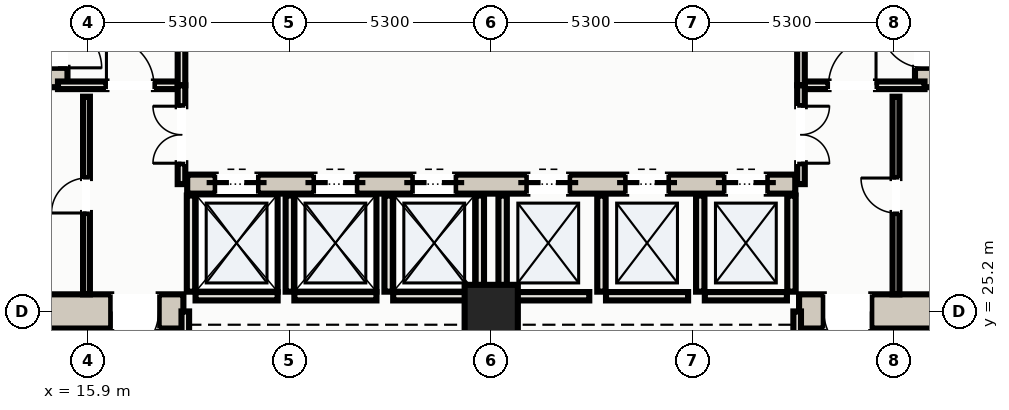
"""IFC4 building model, lengths in metres.
Left out: names, types, materials, properties, quantities, classifications, styles, units other than length and angle.
Written with IfcOpenShell. Run it as: python <this file> out.ifc"""

import sys

from ifc_helpers import new_model, si_unit, direction, frame, frame_2d, origin, origin_2d, place, context, subcontext, project, spatial, rectangle, hollow_rectangle, extrude, element, fill, save


model = new_model("IFC4")
c1 = context("Model", 3, precision=1e-05, world=origin(), true_north=direction((0.0, 1.0)))
c2 = subcontext(c1, "Body", "Model", "MODEL_VIEW")
j1 = project(units=[si_unit("LENGTHUNIT", "METRE"), si_unit("PLANEANGLEUNIT", "RADIAN")], contexts=[c1])
p1 = place(None, origin())
s1 = spatial("IfcSite", under=j1, at=p1, CompositionType="ELEMENT")
p2 = place(p1, origin())
s2 = spatial("IfcBuilding", under=s1, at=p2, CompositionType="ELEMENT")
p3 = place(p2, origin())
s3 = spatial("IfcBuildingStorey", under=s2, at=p3, CompositionType="ELEMENT", Elevation=0.0)
p4 = place(p3, frame((10.15, 25.2, 0.0), z_axis=(0.0, 0.0, 1.0), x_axis=(1.0, 0.0, 0.0)))
e1 = element("IfcWall", 1, at=p4, inside=s3, PredefinedType="SHEAR", context=c2, shape_type="SweptSolid", body=[
    extrude(rectangle(XDim=8.25, YDim=0.9, at=frame_2d((4.125, 0.0))), origin(), (0.0, 0.0, 1.0), 4.95),
])
p5 = place(p4, frame((6.35, 0.0, 0.0)))
e2 = element("IfcOpeningElement", 2, at=p5, cuts=e1, PredefinedType="OPENING", context=c2, shape_type="SweptSolid", body=[
    extrude(rectangle(XDim=1.25, YDim=2.2, at=frame_2d((0.625, 1.1))), frame((0.0, 0.46, 0.0), z_axis=(0.0, -1.0, 0.0), x_axis=(1.0, 0.0, 0.0)), (0.0, 0.0, 1.0), 0.92),
])
p6 = place(p3, frame((34.6, 25.2, 0.0), z_axis=(0.0, 0.0, 1.0), x_axis=(1.0, 0.0, 0.0)))
e3 = element("IfcWall", 3, at=p6, inside=s3, PredefinedType="SHEAR", context=c2, shape_type="SweptSolid", body=[
    extrude(rectangle(XDim=8.25, YDim=0.9, at=frame_2d((4.125, 0.0))), origin(), (0.0, 0.0, 1.0), 4.95),
])
p7 = place(p6, frame((0.65, 0.0, 0.0)))
e4 = element("IfcOpeningElement", 4, at=p7, cuts=e3, PredefinedType="OPENING", context=c2, shape_type="SweptSolid", body=[
    extrude(rectangle(XDim=1.25, YDim=2.2, at=frame_2d((0.625, 1.1))), frame((0.0, 0.46, 0.0), z_axis=(0.0, -1.0, 0.0), x_axis=(1.0, 0.0, 0.0)), (0.0, 0.0, 1.0), 0.92),
])
p8 = place(p3, frame((15.1, 31.1, 0.0), z_axis=(0.0, 0.0, 1.0), x_axis=(0.0, 1.0, 0.0)))
e5 = element("IfcWall", 5, at=p8, inside=s3, PredefinedType="SHEAR", context=c2, shape_type="SweptSolid", body=[
    extrude(rectangle(XDim=8.45, YDim=0.5, at=frame_2d((4.225, 0.0))), origin(), (0.0, 0.0, 1.0), 4.95),
])
p9 = place(p8, frame((0.51, 0.0, 0.0)))
e6 = element("IfcOpeningElement", 6, at=p9, cuts=e5, PredefinedType="OPENING", context=c2, shape_type="SweptSolid", body=[
    extrude(rectangle(XDim=1.15, YDim=2.2, at=frame_2d((0.575, 1.1))), frame((0.0, 0.26, 0.0), z_axis=(0.0, -1.0, 0.0), x_axis=(1.0, 0.0, 0.0)), (0.0, 0.0, 1.0), 0.52),
])
p10 = place(p3, frame((37.9, 31.1, 0.0), z_axis=(0.0, 0.0, 1.0), x_axis=(0.0, 1.0, 0.0)))
e7 = element("IfcWall", 7, at=p10, inside=s3, PredefinedType="SHEAR", context=c2, shape_type="SweptSolid", body=[
    extrude(rectangle(XDim=8.45, YDim=0.5, at=frame_2d((4.225, 0.0))), origin(), (0.0, 0.0, 1.0), 4.95),
])
p11 = place(p10, frame((0.51, 0.0, 0.0)))
e8 = element("IfcOpeningElement", 8, at=p11, cuts=e7, PredefinedType="OPENING", context=c2, shape_type="SweptSolid", body=[
    extrude(rectangle(XDim=1.15, YDim=2.2, at=frame_2d((0.575, 1.1))), frame((0.0, 0.26, 0.0), z_axis=(0.0, -1.0, 0.0), x_axis=(1.0, 0.0, 0.0)), (0.0, 0.0, 1.0), 0.52),
])
p12 = place(p3, frame((18.5, 28.55, 0.0), z_axis=(0.0, 0.0, 1.0), x_axis=(1.0, 0.0, 0.0)))
e9 = element("IfcWall", 9, at=p12, inside=s3, PredefinedType="SHEAR", context=c2, shape_type="SweptSolid", body=[
    extrude(rectangle(XDim=16.0, YDim=0.5, at=frame_2d((8.0, 0.0))), origin(), (0.0, 0.0, 1.0), 4.95),
])
p13 = place(p12, frame((0.75, 0.0, 0.0)))
e10 = element("IfcOpeningElement", 10, at=p13, cuts=e9, PredefinedType="OPENING", context=c2, shape_type="SweptSolid", body=[
    extrude(rectangle(XDim=1.1, YDim=2.15, at=frame_2d((0.55, 1.075))), frame((0.0, 0.26, 0.0), z_axis=(0.0, -1.0, 0.0), x_axis=(1.0, 0.0, 0.0)), (0.0, 0.0, 1.0), 0.52),
])
p14 = place(p12, frame((3.35, 0.0, 0.0)))
e11 = element("IfcOpeningElement", 11, at=p14, cuts=e9, PredefinedType="OPENING", context=c2, shape_type="SweptSolid", body=[
    extrude(rectangle(XDim=1.1, YDim=2.15, at=frame_2d((0.55, 1.075))), frame((0.0, 0.26, 0.0), z_axis=(0.0, -1.0, 0.0), x_axis=(1.0, 0.0, 0.0)), (0.0, 0.0, 1.0), 0.52),
])
p15 = place(p12, frame((5.95, 0.0, 0.0)))
e12 = element("IfcOpeningElement", 12, at=p15, cuts=e9, PredefinedType="OPENING", context=c2, shape_type="SweptSolid", body=[
    extrude(rectangle(XDim=1.1, YDim=2.15, at=frame_2d((0.55, 1.075))), frame((0.0, 0.26, 0.0), z_axis=(0.0, -1.0, 0.0), x_axis=(1.0, 0.0, 0.0)), (0.0, 0.0, 1.0), 0.52),
])
p16 = place(p12, frame((8.95, 0.0, 0.0)))
e13 = element("IfcOpeningElement", 13, at=p16, cuts=e9, PredefinedType="OPENING", context=c2, shape_type="SweptSolid", body=[
    extrude(rectangle(XDim=1.1, YDim=2.15, at=frame_2d((0.55, 1.075))), frame((0.0, 0.26, 0.0), z_axis=(0.0, -1.0, 0.0), x_axis=(1.0, 0.0, 0.0)), (0.0, 0.0, 1.0), 0.52),
])
p17 = place(p12, frame((11.55, 0.0, 0.0)))
e14 = element("IfcOpeningElement", 14, at=p17, cuts=e9, PredefinedType="OPENING", context=c2, shape_type="SweptSolid", body=[
    extrude(rectangle(XDim=1.1, YDim=2.15, at=frame_2d((0.55, 1.075))), frame((0.0, 0.26, 0.0), z_axis=(0.0, -1.0, 0.0), x_axis=(1.0, 0.0, 0.0)), (0.0, 0.0, 1.0), 0.52),
])
p18 = place(p12, frame((14.15, 0.0, 0.0)))
e15 = element("IfcOpeningElement", 15, at=p18, cuts=e9, PredefinedType="OPENING", context=c2, shape_type="SweptSolid", body=[
    extrude(rectangle(XDim=1.1, YDim=2.15, at=frame_2d((0.55, 1.075))), frame((0.0, 0.26, 0.0), z_axis=(0.0, -1.0, 0.0), x_axis=(1.0, 0.0, 0.0)), (0.0, 0.0, 1.0), 0.52),
])
p19 = place(p3, frame((26.5, 25.2, 0.0), z_axis=(0.0, 0.0, 1.0), x_axis=(1.0, 0.0, 0.0)))
e16 = element("IfcColumn", 16, at=p19, inside=s3, PredefinedType="COLUMN", context=c2, shape_type="SweptSolid", body=[
    extrude(hollow_rectangle(XDim=1.4, YDim=1.4, WallThickness=0.045, at=origin_2d()), origin(), (0.0, 0.0, 1.0), 5.2),
])
p20 = place(p3, frame((18.6, 25.72, 0.0), z_axis=(0.0, 0.0, 1.0), x_axis=(0.0, 1.0, 0.0)))
e17 = element("IfcWall", 17, at=p20, inside=s3, PredefinedType="SOLIDWALL", context=c2, shape_type="SweptSolid", body=[
    extrude(rectangle(XDim=2.53, YDim=0.22, at=frame_2d((1.265, 0.0))), origin(), (0.0, 0.0, 1.0), 4.95),
])
p21 = place(p3, frame((18.72, 25.6, 0.0), z_axis=(0.0, 0.0, 1.0), x_axis=(1.0, 0.0, 0.0)))
e18 = element("IfcWall", 18, at=p21, inside=s3, PredefinedType="SOLIDWALL", context=c2, shape_type="SweptSolid", body=[
    extrude(rectangle(XDim=2.16, YDim=0.22, at=frame_2d((1.08, 0.0))), origin(), (0.0, 0.0, 1.0), 4.95),
])
p22 = place(p3, frame((21.2, 25.72, 0.0), z_axis=(0.0, 0.0, 1.0), x_axis=(0.0, 1.0, 0.0)))
e19 = element("IfcWall", 19, at=p22, inside=s3, PredefinedType="SOLIDWALL", context=c2, shape_type="SweptSolid", body=[
    extrude(rectangle(XDim=2.53, YDim=0.22, at=frame_2d((1.265, 0.0))), origin(), (0.0, 0.0, 1.0), 4.95),
])
p23 = place(p3, frame((21.32, 25.6, 0.0), z_axis=(0.0, 0.0, 1.0), x_axis=(1.0, 0.0, 0.0)))
e20 = element("IfcWall", 20, at=p23, inside=s3, PredefinedType="SOLIDWALL", context=c2, shape_type="SweptSolid", body=[
    extrude(rectangle(XDim=2.16, YDim=0.22, at=frame_2d((1.08, 0.0))), origin(), (0.0, 0.0, 1.0), 4.95),
])
for number, where, z_axis, x_axis in (
    (21, (23.8, 25.72, 0.0), (0.0, 0.0, 1.0), (0.0, 1.0, 0.0)),
    (22, (26.2, 25.72, 0.0), (0.0, 0.0, 1.0), (0.0, 1.0, 0.0)),
):
    element("IfcWall", number, at=place(p3, frame(where, z_axis=z_axis, x_axis=x_axis)), inside=s3, PredefinedType="SOLIDWALL", context=c2, shape_type="SweptSolid", body=[
        extrude(rectangle(XDim=2.53, YDim=0.22, at=frame_2d((1.265, 0.0))), origin(), (0.0, 0.0, 1.0), 4.95),
    ])
p24 = place(p3, frame((23.92, 25.6, 0.0), z_axis=(0.0, 0.0, 1.0), x_axis=(1.0, 0.0, 0.0)))
e23 = element("IfcWall", 23, at=p24, inside=s3, PredefinedType="SOLIDWALL", context=c2, shape_type="SweptSolid", body=[
    extrude(rectangle(XDim=2.16, YDim=0.22, at=frame_2d((1.08, 0.0))), origin(), (0.0, 0.0, 1.0), 4.95),
])
p25 = place(p3, frame((26.8, 25.72, 0.0), z_axis=(0.0, 0.0, 1.0), x_axis=(0.0, 1.0, 0.0)))
e24 = element("IfcWall", 24, at=p25, inside=s3, PredefinedType="SOLIDWALL", context=c2, shape_type="SweptSolid", body=[
    extrude(rectangle(XDim=2.53, YDim=0.22, at=frame_2d((1.265, 0.0))), origin(), (0.0, 0.0, 1.0), 4.95),
])
p26 = place(p3, frame((26.92, 25.6, 0.0), z_axis=(0.0, 0.0, 1.0), x_axis=(1.0, 0.0, 0.0)))
e25 = element("IfcWall", 25, at=p26, inside=s3, PredefinedType="SOLIDWALL", context=c2, shape_type="SweptSolid", body=[
    extrude(rectangle(XDim=2.16, YDim=0.22, at=frame_2d((1.08, 0.0))), origin(), (0.0, 0.0, 1.0), 3.995),
])
p27 = place(p3, frame((29.4, 25.72, 0.0), z_axis=(0.0, 0.0, 1.0), x_axis=(0.0, 1.0, 0.0)))
e26 = element("IfcWall", 26, at=p27, inside=s3, PredefinedType="SOLIDWALL", context=c2, shape_type="SweptSolid", body=[
    extrude(rectangle(XDim=2.53, YDim=0.22, at=frame_2d((1.265, 0.0))), origin(), (0.0, 0.0, 1.0), 4.95),
])
p28 = place(p3, frame((29.52, 25.6, 0.0), z_axis=(0.0, 0.0, 1.0), x_axis=(1.0, 0.0, 0.0)))
e27 = element("IfcWall", 27, at=p28, inside=s3, PredefinedType="SOLIDWALL", context=c2, shape_type="SweptSolid", body=[
    extrude(rectangle(XDim=2.16, YDim=0.22, at=frame_2d((1.08, 0.0))), origin(), (0.0, 0.0, 1.0), 3.995),
])
for number, where, z_axis, x_axis in (
    (28, (32.0, 25.72, 0.0), (0.0, 0.0, 1.0), (0.0, 1.0, 0.0)),
    (29, (34.4, 25.72, 0.0), (0.0, 0.0, 1.0), (0.0, 1.0, 0.0)),
):
    element("IfcWall", number, at=place(p3, frame(where, z_axis=z_axis, x_axis=x_axis)), inside=s3, PredefinedType="SOLIDWALL", context=c2, shape_type="SweptSolid", body=[
        extrude(rectangle(XDim=2.53, YDim=0.22, at=frame_2d((1.265, 0.0))), origin(), (0.0, 0.0, 1.0), 4.95),
    ])
p29 = place(p3, frame((32.12, 25.6, 0.0), z_axis=(0.0, 0.0, 1.0), x_axis=(1.0, 0.0, 0.0)))
e30 = element("IfcWall", 30, at=p29, inside=s3, PredefinedType="SOLIDWALL", context=c2, shape_type="SweptSolid", body=[
    extrude(rectangle(XDim=2.16, YDim=0.22, at=frame_2d((1.08, 0.0))), origin(), (0.0, 0.0, 1.0), 3.995),
])
p30 = place(p3, frame((15.1, 31.15, 0.0), z_axis=(0.0, 0.0, 1.0), x_axis=(1.0, 0.0, 0.0)))
e31 = element("IfcWall", 31, at=p30, inside=s3, PredefinedType="PARTITIONING", context=c2, shape_type="SweptSolid", body=[
    extrude(rectangle(XDim=3.25, YDim=0.2, at=frame_2d((1.625, 0.0))), origin(), (0.0, 0.0, 1.0), 4.95),
])
p31 = place(p30, frame((1.275, 0.0, 0.0)))
e32 = element("IfcOpeningElement", 32, at=p31, cuts=e31, PredefinedType="OPENING", context=c2, shape_type="SweptSolid", body=[
    extrude(rectangle(XDim=1.25, YDim=2.2, at=frame_2d((0.625, 1.1))), frame((0.0, 0.11, 0.0), z_axis=(0.0, -1.0, 0.0), x_axis=(1.0, 0.0, 0.0)), (0.0, 0.0, 1.0), 0.22),
])
p32 = place(p3, frame((18.35, 31.15, 0.0), z_axis=(0.0, 0.0, 1.0), x_axis=(0.0, 1.0, 0.0)))
e33 = element("IfcWall", 33, at=p32, inside=s3, PredefinedType="PARTITIONING", context=c2, shape_type="SweptSolid", body=[
    extrude(rectangle(XDim=5.15, YDim=0.2, at=frame_2d((2.575, 0.0))), origin(), (0.0, 0.0, 1.0), 4.95),
])
p33 = place(p32, frame((1.875, 0.0, 0.0)))
e34 = element("IfcOpeningElement", 34, at=p33, cuts=e33, PredefinedType="OPENING", context=c2, shape_type="SweptSolid", body=[
    extrude(rectangle(XDim=1.25, YDim=2.2, at=frame_2d((0.625, 1.1))), frame((0.0, 0.11, 0.0), z_axis=(0.0, -1.0, 0.0), x_axis=(1.0, 0.0, 0.0)), (0.0, 0.0, 1.0), 0.22),
])
p34 = place(p3, frame((34.65, 31.15, 0.0), z_axis=(0.0, 0.0, 1.0), x_axis=(1.0, 0.0, 0.0)))
e35 = element("IfcWall", 35, at=p34, inside=s3, PredefinedType="PARTITIONING", context=c2, shape_type="SweptSolid", body=[
    extrude(rectangle(XDim=3.25, YDim=0.2, at=frame_2d((1.625, 0.0))), origin(), (0.0, 0.0, 1.0), 4.95),
])
p35 = place(p34, frame((0.725, 0.0, 0.0)))
e36 = element("IfcOpeningElement", 36, at=p35, cuts=e35, PredefinedType="OPENING", context=c2, shape_type="SweptSolid", body=[
    extrude(rectangle(XDim=1.25, YDim=2.2, at=frame_2d((0.625, 1.1))), frame((0.0, 0.11, 0.0), z_axis=(0.0, -1.0, 0.0), x_axis=(1.0, 0.0, 0.0)), (0.0, 0.0, 1.0), 0.22),
])
p36 = place(p3, frame((34.65, 31.15, 0.0), z_axis=(0.0, 0.0, 1.0), x_axis=(0.0, 1.0, 0.0)))
e37 = element("IfcWall", 37, at=p36, inside=s3, PredefinedType="PARTITIONING", context=c2, shape_type="SweptSolid", body=[
    extrude(rectangle(XDim=5.15, YDim=0.2, at=frame_2d((2.575, 0.0))), origin(), (0.0, 0.0, 1.0), 4.95),
])
p37 = place(p36, frame((1.875, 0.0, 0.0)))
e38 = element("IfcOpeningElement", 38, at=p37, cuts=e37, PredefinedType="OPENING", context=c2, shape_type="SweptSolid", body=[
    extrude(rectangle(XDim=1.25, YDim=2.2, at=frame_2d((0.625, 1.1))), frame((0.0, 0.11, 0.0), z_axis=(0.0, -1.0, 0.0), x_axis=(1.0, 0.0, 0.0)), (0.0, 0.0, 1.0), 0.22),
])
p38 = place(p3, frame((15.85, 25.65, 0.0), z_axis=(0.0, 0.0, 1.0), x_axis=(0.0, 1.0, 0.0)))
e39 = element("IfcWall", 39, at=p38, inside=s3, PredefinedType="PARTITIONING", context=c2, shape_type="SweptSolid", body=[
    extrude(rectangle(XDim=5.2, YDim=0.18, at=frame_2d((2.6, 0.0))), origin(), (0.0, 0.0, 1.0), 4.95),
])
p39 = place(p38, frame((2.14, 0.0, 0.0)))
e40 = element("IfcOpeningElement", 40, at=p39, cuts=e39, PredefinedType="OPENING", context=c2, shape_type="SweptSolid", body=[
    extrude(rectangle(XDim=0.92, YDim=2.15, at=frame_2d((0.46, 1.075))), frame((0.0, 0.1, 0.0), z_axis=(0.0, -1.0, 0.0), x_axis=(1.0, 0.0, 0.0)), (0.0, 0.0, 1.0), 0.2),
])
p40 = place(p3, frame((37.15, 25.65, 0.0), z_axis=(0.0, 0.0, 1.0), x_axis=(0.0, 1.0, 0.0)))
e41 = element("IfcWall", 41, at=p40, inside=s3, PredefinedType="PARTITIONING", context=c2, shape_type="SweptSolid", body=[
    extrude(rectangle(XDim=5.2, YDim=0.18, at=frame_2d((2.6, 0.0))), origin(), (0.0, 0.0, 1.0), 4.95),
])
p41 = place(p40, frame((2.14, 0.0, 0.0)))
e42 = element("IfcOpeningElement", 42, at=p41, cuts=e41, PredefinedType="OPENING", context=c2, shape_type="SweptSolid", body=[
    extrude(rectangle(XDim=0.92, YDim=2.15, at=frame_2d((0.46, 1.075))), frame((0.0, 0.1, 0.0), z_axis=(0.0, -1.0, 0.0), x_axis=(1.0, 0.0, 0.0)), (0.0, 0.0, 1.0), 0.2),
])
p42 = place(p3, frame((18.35, 28.55, 0.0), z_axis=(0.0, 0.0, 1.0), x_axis=(0.0, 1.0, 0.0)))
e43 = element("IfcWall", 43, at=p42, inside=s3, PredefinedType="PARTITIONING", context=c2, shape_type="SweptSolid", body=[
    extrude(rectangle(XDim=2.6, YDim=0.2, at=frame_2d((1.3, 0.0))), origin(), (0.0, 0.0, 1.0), 4.95),
])
p43 = place(p42, frame((0.55, 0.0, 0.0)))
e44 = element("IfcOpeningElement", 44, at=p43, cuts=e43, PredefinedType="OPENING", context=c2, shape_type="SweptSolid", body=[
    extrude(rectangle(XDim=1.5, YDim=2.25, at=frame_2d((0.75, 1.125))), frame((0.0, 0.11, 0.0), z_axis=(0.0, -1.0, 0.0), x_axis=(1.0, 0.0, 0.0)), (0.0, 0.0, 1.0), 0.22),
])
p44 = place(p3, frame((34.65, 28.55, 0.0), z_axis=(0.0, 0.0, 1.0), x_axis=(0.0, 1.0, 0.0)))
e45 = element("IfcWall", 45, at=p44, inside=s3, PredefinedType="PARTITIONING", context=c2, shape_type="SweptSolid", body=[
    extrude(rectangle(XDim=2.6, YDim=0.2, at=frame_2d((1.3, 0.0))), origin(), (0.0, 0.0, 1.0), 4.95),
])
p45 = place(p44, frame((0.55, 0.0, 0.0)))
e46 = element("IfcOpeningElement", 46, at=p45, cuts=e45, PredefinedType="OPENING", context=c2, shape_type="SweptSolid", body=[
    extrude(rectangle(XDim=1.5, YDim=2.25, at=frame_2d((0.75, 1.125))), frame((0.0, 0.11, 0.0), z_axis=(0.0, -1.0, 0.0), x_axis=(1.0, 0.0, 0.0)), (0.0, 0.0, 1.0), 0.22),
])
for number, where, z_axis, x_axis in (
    (47, (18.45, 22.6, 0.0), (0.0, 0.0, 1.0), (0.0, 1.0, 0.0)),
    (48, (34.55, 22.6, 0.0), (0.0, 0.0, 1.0), (0.0, 1.0, 0.0)),
):
    element("IfcWall", number, at=place(p3, frame(where, z_axis=z_axis, x_axis=x_axis)), inside=s3, PredefinedType="PARTITIONING", context=c2, shape_type="SweptSolid", body=[
        extrude(rectangle(XDim=2.6, YDim=0.2, at=frame_2d((1.3, 0.0))), origin(), (0.0, 0.0, 1.0), 4.95),
    ])
p46 = place(p13, origin())
e49 = element("IfcDoor", 49, at=p46, inside=s3, OperationType="DOUBLE_DOOR_SLIDING", PredefinedType="DOOR", context=c2, shape_type="SweptSolid", body=[
    extrude(rectangle(XDim=1.1, YDim=2.15, at=frame_2d((0.55, 1.075))), frame((0.0, 0.025, 0.0), z_axis=(0.0, -1.0, 0.0), x_axis=(1.0, 0.0, 0.0)), (0.0, 0.0, 1.0), 0.05),
])
fill(e10, e49)
p47 = place(p14, origin())
e50 = element("IfcDoor", 50, at=p47, inside=s3, OperationType="DOUBLE_DOOR_SLIDING", PredefinedType="DOOR", context=c2, shape_type="SweptSolid", body=[
    extrude(rectangle(XDim=1.1, YDim=2.15, at=frame_2d((0.55, 1.075))), frame((0.0, 0.025, 0.0), z_axis=(0.0, -1.0, 0.0), x_axis=(1.0, 0.0, 0.0)), (0.0, 0.0, 1.0), 0.05),
])
fill(e11, e50)
p48 = place(p15, origin())
e51 = element("IfcDoor", 51, at=p48, inside=s3, OperationType="DOUBLE_DOOR_SLIDING", PredefinedType="DOOR", context=c2, shape_type="SweptSolid", body=[
    extrude(rectangle(XDim=1.1, YDim=2.15, at=frame_2d((0.55, 1.075))), frame((0.0, 0.025, 0.0), z_axis=(0.0, -1.0, 0.0), x_axis=(1.0, 0.0, 0.0)), (0.0, 0.0, 1.0), 0.05),
])
fill(e12, e51)
p49 = place(p16, origin())
e52 = element("IfcDoor", 52, at=p49, inside=s3, OperationType="DOUBLE_DOOR_SLIDING", PredefinedType="DOOR", context=c2, shape_type="SweptSolid", body=[
    extrude(rectangle(XDim=1.1, YDim=2.15, at=frame_2d((0.55, 1.075))), frame((0.0, 0.025, 0.0), z_axis=(0.0, -1.0, 0.0), x_axis=(1.0, 0.0, 0.0)), (0.0, 0.0, 1.0), 0.05),
])
fill(e13, e52)
p50 = place(p17, origin())
e53 = element("IfcDoor", 53, at=p50, inside=s3, OperationType="DOUBLE_DOOR_SLIDING", PredefinedType="DOOR", context=c2, shape_type="SweptSolid", body=[
    extrude(rectangle(XDim=1.1, YDim=2.15, at=frame_2d((0.55, 1.075))), frame((0.0, 0.025, 0.0), z_axis=(0.0, -1.0, 0.0), x_axis=(1.0, 0.0, 0.0)), (0.0, 0.0, 1.0), 0.05),
])
fill(e14, e53)
p51 = place(p18, origin())
e54 = element("IfcDoor", 54, at=p51, inside=s3, OperationType="DOUBLE_DOOR_SLIDING", PredefinedType="DOOR", context=c2, shape_type="SweptSolid", body=[
    extrude(rectangle(XDim=1.1, YDim=2.15, at=frame_2d((0.55, 1.075))), frame((0.0, 0.025, 0.0), z_axis=(0.0, -1.0, 0.0), x_axis=(1.0, 0.0, 0.0)), (0.0, 0.0, 1.0), 0.05),
])
fill(e15, e54)
p52 = place(p5, frame((1.25, 0.0, 0.0), z_axis=(0.0, 0.0, 1.0), x_axis=(-1.0, 0.0, 0.0)))
e55 = element("IfcDoor", 55, at=p52, inside=s3, OperationType="SINGLE_SWING_RIGHT", PredefinedType="DOOR", context=c2, shape_type="SweptSolid", body=[
    extrude(rectangle(XDim=1.25, YDim=2.2, at=frame_2d((0.625, 1.1))), frame((0.0, 0.025, 0.0), z_axis=(0.0, -1.0, 0.0), x_axis=(1.0, 0.0, 0.0)), (0.0, 0.0, 1.0), 0.05),
])
fill(e2, e55)
p53 = place(p7, frame((1.25, 0.0, 0.0), z_axis=(0.0, 0.0, 1.0), x_axis=(-1.0, 0.0, 0.0)))
e56 = element("IfcDoor", 56, at=p53, inside=s3, OperationType="SINGLE_SWING_LEFT", PredefinedType="DOOR", context=c2, shape_type="SweptSolid", body=[
    extrude(rectangle(XDim=1.25, YDim=2.2, at=frame_2d((0.625, 1.1))), frame((0.0, 0.025, 0.0), z_axis=(0.0, -1.0, 0.0), x_axis=(1.0, 0.0, 0.0)), (0.0, 0.0, 1.0), 0.05),
])
fill(e4, e56)
p54 = place(p31, origin())
e57 = element("IfcDoor", 57, at=p54, inside=s3, OperationType="SINGLE_SWING_LEFT", PredefinedType="DOOR", context=c2, shape_type="SweptSolid", body=[
    extrude(rectangle(XDim=1.25, YDim=2.2, at=frame_2d((0.625, 1.1))), frame((0.0, 0.025, 0.0), z_axis=(0.0, -1.0, 0.0), x_axis=(1.0, 0.0, 0.0)), (0.0, 0.0, 1.0), 0.05),
])
fill(e32, e57)
p55 = place(p35, origin())
e58 = element("IfcDoor", 58, at=p55, inside=s3, OperationType="SINGLE_SWING_RIGHT", PredefinedType="DOOR", context=c2, shape_type="SweptSolid", body=[
    extrude(rectangle(XDim=1.25, YDim=2.2, at=frame_2d((0.625, 1.1))), frame((0.0, 0.025, 0.0), z_axis=(0.0, -1.0, 0.0), x_axis=(1.0, 0.0, 0.0)), (0.0, 0.0, 1.0), 0.05),
])
fill(e36, e58)
p56 = place(p9, frame((1.15, 0.0, 0.0), z_axis=(0.0, 0.0, 1.0), x_axis=(-1.0, 0.0, 0.0)))
e59 = element("IfcDoor", 59, at=p56, inside=s3, OperationType="SINGLE_SWING_RIGHT", PredefinedType="DOOR", context=c2, shape_type="SweptSolid", body=[
    extrude(rectangle(XDim=1.15, YDim=2.2, at=frame_2d((0.575, 1.1))), frame((0.0, 0.025, 0.0), z_axis=(0.0, -1.0, 0.0), x_axis=(1.0, 0.0, 0.0)), (0.0, 0.0, 1.0), 0.05),
])
fill(e6, e59)
p57 = place(p11, origin())
e60 = element("IfcDoor", 60, at=p57, inside=s3, OperationType="SINGLE_SWING_RIGHT", PredefinedType="DOOR", context=c2, shape_type="SweptSolid", body=[
    extrude(rectangle(XDim=1.15, YDim=2.2, at=frame_2d((0.575, 1.1))), frame((0.0, 0.025, 0.0), z_axis=(0.0, -1.0, 0.0), x_axis=(1.0, 0.0, 0.0)), (0.0, 0.0, 1.0), 0.05),
])
fill(e8, e60)
p58 = place(p39, origin())
e61 = element("IfcDoor", 61, at=p58, inside=s3, OperationType="SINGLE_SWING_LEFT", PredefinedType="DOOR", context=c2, shape_type="SweptSolid", body=[
    extrude(rectangle(XDim=0.92, YDim=2.15, at=frame_2d((0.46, 1.075))), frame((0.0, 0.025, 0.0), z_axis=(0.0, -1.0, 0.0), x_axis=(1.0, 0.0, 0.0)), (0.0, 0.0, 1.0), 0.05),
])
fill(e40, e61)
p59 = place(p41, origin())
e62 = element("IfcDoor", 62, at=p59, inside=s3, OperationType="SINGLE_SWING_RIGHT", PredefinedType="DOOR", context=c2, shape_type="SweptSolid", body=[
    extrude(rectangle(XDim=0.92, YDim=2.15, at=frame_2d((0.46, 1.075))), frame((0.0, 0.025, 0.0), z_axis=(0.0, -1.0, 0.0), x_axis=(1.0, 0.0, 0.0)), (0.0, 0.0, 1.0), 0.05),
])
fill(e42, e62)
p60 = place(p43, origin())
e63 = element("IfcDoor", 63, at=p60, inside=s3, OperationType="DOUBLE_DOOR_SINGLE_SWING", PredefinedType="DOOR", context=c2, shape_type="SweptSolid", body=[
    extrude(rectangle(XDim=1.5, YDim=2.25, at=frame_2d((0.75, 1.125))), frame((0.0, 0.025, 0.0), z_axis=(0.0, -1.0, 0.0), x_axis=(1.0, 0.0, 0.0)), (0.0, 0.0, 1.0), 0.05),
])
fill(e44, e63)
p61 = place(p45, frame((1.5, 0.0, 0.0), z_axis=(0.0, 0.0, 1.0), x_axis=(-1.0, 0.0, 0.0)))
e64 = element("IfcDoor", 64, at=p61, inside=s3, OperationType="DOUBLE_DOOR_SINGLE_SWING", PredefinedType="DOOR", context=c2, shape_type="SweptSolid", body=[
    extrude(rectangle(XDim=1.5, YDim=2.25, at=frame_2d((0.75, 1.125))), frame((0.0, 0.025, 0.0), z_axis=(0.0, -1.0, 0.0), x_axis=(1.0, 0.0, 0.0)), (0.0, 0.0, 1.0), 0.05),
])
fill(e46, e64)
save(model, sys.argv[1])
